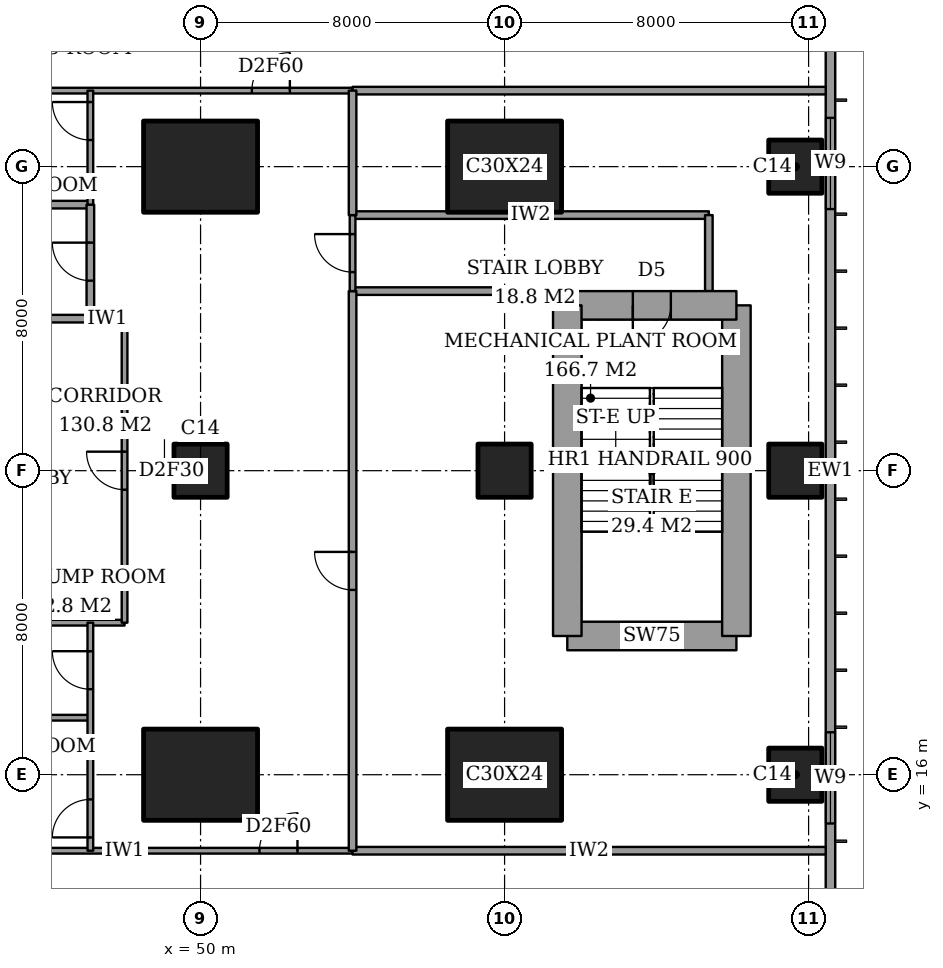
"""IFC4 building model, lengths in metres.
Left out: names, types, materials, properties, quantities, classifications, styles, units other than length and angle.
Written with IfcOpenShell. Run it as: python <this file> out.ifc"""

import sys

from ifc_helpers import new_model, si_unit, direction, frame, frame_2d, origin, origin_2d, place, context, subcontext, project, spatial, rectangle, extrude, element, fill, save


model = new_model("IFC4")
c1 = context("Model", 3, precision=1e-05, world=origin(), true_north=direction((0.0, 1.0)))
c2 = subcontext(c1, "Body", "Model", "MODEL_VIEW")
j1 = project(units=[si_unit("LENGTHUNIT", "METRE"), si_unit("PLANEANGLEUNIT", "RADIAN")], contexts=[c1])
p1 = place(None, origin())
s1 = spatial("IfcSite", under=j1, at=p1, CompositionType="ELEMENT")
p2 = place(p1, origin())
s2 = spatial("IfcBuilding", under=s1, at=p2, CompositionType="ELEMENT")
p3 = place(p2, frame((0.0, 0.0, 277.2)))
s3 = spatial("IfcBuildingStorey", under=s2, at=p3, CompositionType="ELEMENT", Elevation=277.2)
p4 = place(p3, frame((50.0, 16.0, 0.0), z_axis=(0.0, 0.0, 1.0), x_axis=(1.0, 0.0, 0.0)))
e1 = element("IfcColumn", 1, at=p4, inside=s3, PredefinedType="COLUMN", context=c2, shape_type="SweptSolid", body=[
    extrude(rectangle(XDim=3.0, YDim=2.4, at=origin_2d()), origin(), (0.0, 0.0, 1.0), 5.4),
])
p5 = place(p3, frame((50.0, 24.0, 0.0), z_axis=(0.0, 0.0, 1.0), x_axis=(1.0, 0.0, 0.0)))
e2 = element("IfcColumn", 2, at=p5, inside=s3, PredefinedType="COLUMN", context=c2, shape_type="SweptSolid", body=[
    extrude(rectangle(XDim=1.4, YDim=1.4, at=origin_2d()), origin(), (0.0, 0.0, 1.0), 5.4),
])
for number, where, z_axis, x_axis in (
    (3, (50.0, 32.0, 0.0), (0.0, 0.0, 1.0), (1.0, 0.0, 0.0)),
    (4, (58.0, 16.0, 0.0), (0.0, 0.0, 1.0), (1.0, 0.0, 0.0)),
):
    element("IfcColumn", number, at=place(p3, frame(where, z_axis=z_axis, x_axis=x_axis)), inside=s3, PredefinedType="COLUMN", context=c2, shape_type="SweptSolid", body=[
        extrude(rectangle(XDim=3.0, YDim=2.4, at=origin_2d()), origin(), (0.0, 0.0, 1.0), 5.4),
    ])
p6 = place(p3, frame((58.0, 24.0, 0.0), z_axis=(0.0, 0.0, 1.0), x_axis=(1.0, 0.0, 0.0)))
e5 = element("IfcColumn", 5, at=p6, inside=s3, PredefinedType="COLUMN", context=c2, shape_type="SweptSolid", body=[
    extrude(rectangle(XDim=1.4, YDim=1.4, at=origin_2d()), origin(), (0.0, 0.0, 1.0), 5.4),
])
p7 = place(p3, frame((58.0, 32.0, 0.0), z_axis=(0.0, 0.0, 1.0), x_axis=(1.0, 0.0, 0.0)))
e6 = element("IfcColumn", 6, at=p7, inside=s3, PredefinedType="COLUMN", context=c2, shape_type="SweptSolid", body=[
    extrude(rectangle(XDim=3.0, YDim=2.4, at=origin_2d()), origin(), (0.0, 0.0, 1.0), 5.4),
])
for number, where, z_axis, x_axis in (
    (7, (65.65, 16.0, 0.0), (0.0, 0.0, 1.0), (1.0, 0.0, 0.0)),
    (8, (65.65, 24.0, 0.0), (0.0, 0.0, 1.0), (1.0, 0.0, 0.0)),
    (9, (65.65, 32.0, 0.0), (0.0, 0.0, 1.0), (1.0, 0.0, 0.0)),
):
    element("IfcColumn", number, at=place(p3, frame(where, z_axis=z_axis, x_axis=x_axis)), inside=s3, PredefinedType="COLUMN", context=c2, shape_type="SweptSolid", body=[
        extrude(rectangle(XDim=1.4, YDim=1.4, at=origin_2d()), origin(), (0.0, 0.0, 1.0), 5.4),
    ])
p8 = place(p3, frame((59.65, 19.65, 0.0), z_axis=(0.0, 0.0, 1.0), x_axis=(1.0, 0.0, 0.0)))
e10 = element("IfcWall", 10, at=p8, inside=s3, PredefinedType="SHEAR", context=c2, shape_type="SweptSolid", body=[
    extrude(rectangle(XDim=4.45, YDim=0.75, at=frame_2d((2.225, 0.0))), origin(), (0.0, 0.0, 1.0), 5.4),
])
p9 = place(p3, frame((64.1, 19.65, 0.0), z_axis=(0.0, 0.0, 1.0), x_axis=(0.0, 1.0, 0.0)))
e11 = element("IfcWall", 11, at=p9, inside=s3, PredefinedType="SHEAR", context=c2, shape_type="SweptSolid", body=[
    extrude(rectangle(XDim=8.7, YDim=0.75, at=frame_2d((4.35, 0.0))), origin(), (0.0, 0.0, 1.0), 5.4),
])
p10 = place(p3, frame((64.1, 28.35, 0.0), z_axis=(0.0, 0.0, 1.0), x_axis=(-1.0, 0.0, 0.0)))
e12 = element("IfcWall", 12, at=p10, inside=s3, PredefinedType="SHEAR", context=c2, shape_type="SweptSolid", body=[
    extrude(rectangle(XDim=4.45, YDim=0.75, at=frame_2d((2.225, 0.0))), origin(), (0.0, 0.0, 1.0), 5.4),
])
p11 = place(p10, frame((1.725, 0.0, 0.0)))
e13 = element("IfcOpeningElement", 13, at=p11, cuts=e12, PredefinedType="OPENING", context=c2, shape_type="SweptSolid", body=[
    extrude(rectangle(XDim=1.0, YDim=2.1, at=frame_2d((0.5, 1.05))), frame((0.0, 0.385, 0.0), z_axis=(0.0, -1.0, 0.0), x_axis=(1.0, 0.0, 0.0)), (0.0, 0.0, 1.0), 0.77),
])
p12 = place(p3, frame((59.65, 28.35, 0.0), z_axis=(0.0, 0.0, 1.0), x_axis=(0.0, -1.0, 0.0)))
e14 = element("IfcWall", 14, at=p12, inside=s3, PredefinedType="SHEAR", context=c2, shape_type="SweptSolid", body=[
    extrude(rectangle(XDim=8.7, YDim=0.75, at=frame_2d((4.35, 0.0))), origin(), (0.0, 0.0, 1.0), 5.4),
])
p13 = place(p3, frame((66.575, 3.175, 0.0), z_axis=(0.0, 0.0, 1.0), x_axis=(0.0, 1.0, 0.0)))
e15 = element("IfcWall", 15, at=p13, inside=s3, PredefinedType="SOLIDWALL", context=c2, shape_type="SweptSolid", body=[
    extrude(rectangle(XDim=41.65, YDim=0.25, at=frame_2d((20.825, 0.0))), origin(), (0.0, 0.0, 1.0), 5.4),
])
p14 = place(p13, frame((0.908, 0.0, 0.9)))
e16 = element("IfcOpeningElement", 16, at=p14, cuts=e15, PredefinedType="OPENING", context=c2, shape_type="SweptSolid", body=[
    extrude(rectangle(XDim=2.4, YDim=2.4, at=frame_2d((1.2, 1.2))), frame((0.0, 0.135, 0.0), z_axis=(0.0, -1.0, 0.0), x_axis=(1.0, 0.0, 0.0)), (0.0, 0.0, 1.0), 0.27),
])
p15 = place(p13, frame((11.542, 0.0, 0.9)))
e17 = element("IfcOpeningElement", 17, at=p15, cuts=e15, PredefinedType="OPENING", context=c2, shape_type="SweptSolid", body=[
    extrude(rectangle(XDim=2.4, YDim=2.4, at=frame_2d((1.2, 1.2))), frame((0.0, 0.135, 0.0), z_axis=(0.0, -1.0, 0.0), x_axis=(1.0, 0.0, 0.0)), (0.0, 0.0, 1.0), 0.27),
])
p16 = place(p13, frame((27.708, 0.0, 0.9)))
e18 = element("IfcOpeningElement", 18, at=p16, cuts=e15, PredefinedType="OPENING", context=c2, shape_type="SweptSolid", body=[
    extrude(rectangle(XDim=2.4, YDim=2.4, at=frame_2d((1.2, 1.2))), frame((0.0, 0.135, 0.0), z_axis=(0.0, -1.0, 0.0), x_axis=(1.0, 0.0, 0.0)), (0.0, 0.0, 1.0), 0.27),
])
p17 = place(p13, frame((38.342, 0.0, 0.9)))
e19 = element("IfcOpeningElement", 19, at=p17, cuts=e15, PredefinedType="OPENING", context=c2, shape_type="SweptSolid", body=[
    extrude(rectangle(XDim=2.4, YDim=2.4, at=frame_2d((1.2, 1.2))), frame((0.0, 0.135, 0.0), z_axis=(0.0, -1.0, 0.0), x_axis=(1.0, 0.0, 0.0)), (0.0, 0.0, 1.0), 0.27),
])
p18 = place(p3, frame((54.0, 14.0, 0.0), z_axis=(0.0, 0.0, 1.0), x_axis=(1.0, 0.0, 0.0)))
e20 = element("IfcWall", 20, at=p18, inside=s3, PredefinedType="PARTITIONING", context=c2, shape_type="SweptSolid", body=[
    extrude(rectangle(XDim=12.45, YDim=0.2, at=frame_2d((6.225, 0.0))), origin(), (0.0, 0.0, 1.0), 5.15),
])
p19 = place(p3, frame((42.0, 14.0, 0.0), z_axis=(0.0, 0.0, 1.0), x_axis=(1.0, 0.0, 0.0)))
e21 = element("IfcWall", 21, at=p19, inside=s3, PredefinedType="PARTITIONING", context=c2, shape_type="SweptSolid", body=[
    extrude(rectangle(XDim=12.0, YDim=0.15, at=frame_2d((6.0, 0.0))), origin(), (0.0, 0.0, 1.0), 5.15),
])
p20 = place(p19, frame((9.55, 0.0, 0.0)))
e22 = element("IfcOpeningElement", 22, at=p20, cuts=e21, PredefinedType="OPENING", context=c2, shape_type="SweptSolid", body=[
    extrude(rectangle(XDim=1.0, YDim=2.1, at=frame_2d((0.5, 1.05))), frame((0.0, 0.085, 0.0), z_axis=(0.0, -1.0, 0.0), x_axis=(1.0, 0.0, 0.0)), (0.0, 0.0, 1.0), 0.17),
])
p21 = place(p3, frame((42.0, 17.5, 0.0), z_axis=(0.0, 0.0, 1.0), x_axis=(1.0, 0.0, 0.0)))
e23 = element("IfcWall", 23, at=p21, inside=s3, PredefinedType="PARTITIONING", context=c2, shape_type="SweptSolid", body=[
    extrude(rectangle(XDim=5.1, YDim=0.15, at=frame_2d((2.55, 0.0))), origin(), (0.0, 0.0, 1.0), 5.15),
])
p22 = place(p3, frame((42.0, 20.0, 0.0), z_axis=(0.0, 0.0, 1.0), x_axis=(1.0, 0.0, 0.0)))
e24 = element("IfcWall", 24, at=p22, inside=s3, PredefinedType="PARTITIONING", context=c2, shape_type="SweptSolid", body=[
    extrude(rectangle(XDim=6.0, YDim=0.15, at=frame_2d((3.0, 0.0))), origin(), (0.0, 0.0, 1.0), 5.15),
])
p23 = place(p3, frame((42.0, 28.0, 0.0), z_axis=(0.0, 0.0, 1.0), x_axis=(1.0, 0.0, 0.0)))
e25 = element("IfcWall", 25, at=p23, inside=s3, PredefinedType="PARTITIONING", context=c2, shape_type="SweptSolid", body=[
    extrude(rectangle(XDim=5.1, YDim=0.2, at=frame_2d((2.55, 0.0))), origin(), (0.0, 0.0, 1.0), 5.15),
])
p24 = place(p3, frame((47.1, 28.0, 0.0), z_axis=(0.0, 0.0, 1.0), x_axis=(1.0, 0.0, 0.0)))
e26 = element("IfcWall", 26, at=p24, inside=s3, PredefinedType="PARTITIONING", context=c2, shape_type="SweptSolid", body=[
    extrude(rectangle(XDim=0.9, YDim=0.15, at=frame_2d((0.45, 0.0))), origin(), (0.0, 0.0, 1.0), 5.15),
])
p25 = place(p3, frame((54.0, 28.725, 0.0), z_axis=(0.0, 0.0, 1.0), x_axis=(1.0, 0.0, 0.0)))
e27 = element("IfcWall", 27, at=p25, inside=s3, PredefinedType="PARTITIONING", context=c2, shape_type="SweptSolid", body=[
    extrude(rectangle(XDim=5.65, YDim=0.2, at=frame_2d((2.825, 0.0))), origin(), (0.0, 0.0, 1.0), 5.15),
])
p26 = place(p3, frame((54.0, 30.725, 0.0), z_axis=(0.0, 0.0, 1.0), x_axis=(1.0, 0.0, 0.0)))
e28 = element("IfcWall", 28, at=p26, inside=s3, PredefinedType="PARTITIONING", context=c2, shape_type="SweptSolid", body=[
    extrude(rectangle(XDim=9.375, YDim=0.2, at=frame_2d((4.688, 0.0))), origin(), (0.0, 0.0, 1.0), 5.15),
])
p27 = place(p3, frame((42.0, 31.0, 0.0), z_axis=(0.0, 0.0, 1.0), x_axis=(1.0, 0.0, 0.0)))
e29 = element("IfcWall", 29, at=p27, inside=s3, PredefinedType="PARTITIONING", context=c2, shape_type="SweptSolid", body=[
    extrude(rectangle(XDim=5.1, YDim=0.2, at=frame_2d((2.55, 0.0))), origin(), (0.0, 0.0, 1.0), 5.15),
])
p28 = place(p3, frame((54.0, 34.0, 0.0), z_axis=(0.0, 0.0, 1.0), x_axis=(1.0, 0.0, 0.0)))
e30 = element("IfcWall", 30, at=p28, inside=s3, PredefinedType="PARTITIONING", context=c2, shape_type="SweptSolid", body=[
    extrude(rectangle(XDim=12.45, YDim=0.2, at=frame_2d((6.225, 0.0))), origin(), (0.0, 0.0, 1.0), 5.15),
])
p29 = place(p3, frame((42.0, 34.0, 0.0), z_axis=(0.0, 0.0, 1.0), x_axis=(1.0, 0.0, 0.0)))
e31 = element("IfcWall", 31, at=p29, inside=s3, PredefinedType="PARTITIONING", context=c2, shape_type="SweptSolid", body=[
    extrude(rectangle(XDim=12.0, YDim=0.15, at=frame_2d((6.0, 0.0))), origin(), (0.0, 0.0, 1.0), 5.15),
])
p30 = place(p29, frame((9.35, 0.0, 0.0)))
e32 = element("IfcOpeningElement", 32, at=p30, cuts=e31, PredefinedType="OPENING", context=c2, shape_type="SweptSolid", body=[
    extrude(rectangle(XDim=1.0, YDim=2.1, at=frame_2d((0.5, 1.05))), frame((0.0, 0.085, 0.0), z_axis=(0.0, -1.0, 0.0), x_axis=(1.0, 0.0, 0.0)), (0.0, 0.0, 1.0), 0.17),
])
p31 = place(p3, frame((47.1, 28.0, 0.0), z_axis=(0.0, 0.0, 1.0), x_axis=(0.0, 1.0, 0.0)))
e33 = element("IfcWall", 33, at=p31, inside=s3, PredefinedType="PARTITIONING", context=c2, shape_type="SweptSolid", body=[
    extrude(rectangle(XDim=3.0, YDim=0.2, at=frame_2d((1.5, 0.0))), origin(), (0.0, 0.0, 1.0), 5.15),
])
p32 = place(p31, frame((1.0, 0.0, 0.0)))
e34 = element("IfcOpeningElement", 34, at=p32, cuts=e33, PredefinedType="OPENING", context=c2, shape_type="SweptSolid", body=[
    extrude(rectangle(XDim=1.0, YDim=2.1, at=frame_2d((0.5, 1.05))), frame((0.0, 0.11, 0.0), z_axis=(0.0, -1.0, 0.0), x_axis=(1.0, 0.0, 0.0)), (0.0, 0.0, 1.0), 0.22),
])
p33 = place(p3, frame((47.1, 14.0, 0.0), z_axis=(0.0, 0.0, 1.0), x_axis=(0.0, 1.0, 0.0)))
e35 = element("IfcWall", 35, at=p33, inside=s3, PredefinedType="PARTITIONING", context=c2, shape_type="SweptSolid", body=[
    extrude(rectangle(XDim=6.0, YDim=0.15, at=frame_2d((3.0, 0.0))), origin(), (0.0, 0.0, 1.0), 5.15),
])
p34 = place(p33, frame((0.35, 0.0, 0.0)))
e36 = element("IfcOpeningElement", 36, at=p34, cuts=e35, PredefinedType="OPENING", context=c2, shape_type="SweptSolid", body=[
    extrude(rectangle(XDim=1.0, YDim=2.1, at=frame_2d((0.5, 1.05))), frame((0.0, 0.085, 0.0), z_axis=(0.0, -1.0, 0.0), x_axis=(1.0, 0.0, 0.0)), (0.0, 0.0, 1.0), 0.17),
])
p35 = place(p33, frame((4.25, 0.0, 0.0)))
e37 = element("IfcOpeningElement", 37, at=p35, cuts=e35, PredefinedType="OPENING", context=c2, shape_type="SweptSolid", body=[
    extrude(rectangle(XDim=1.0, YDim=2.1, at=frame_2d((0.5, 1.05))), frame((0.0, 0.085, 0.0), z_axis=(0.0, -1.0, 0.0), x_axis=(1.0, 0.0, 0.0)), (0.0, 0.0, 1.0), 0.17),
])
p36 = place(p3, frame((47.1, 31.0, 0.0), z_axis=(0.0, 0.0, 1.0), x_axis=(0.0, 1.0, 0.0)))
e38 = element("IfcWall", 38, at=p36, inside=s3, PredefinedType="PARTITIONING", context=c2, shape_type="SweptSolid", body=[
    extrude(rectangle(XDim=3.0, YDim=0.15, at=frame_2d((1.5, 0.0))), origin(), (0.0, 0.0, 1.0), 5.15),
])
p37 = place(p36, frame((1.7, 0.0, 0.0)))
e39 = element("IfcOpeningElement", 39, at=p37, cuts=e38, PredefinedType="OPENING", context=c2, shape_type="SweptSolid", body=[
    extrude(rectangle(XDim=1.0, YDim=2.1, at=frame_2d((0.5, 1.05))), frame((0.0, 0.085, 0.0), z_axis=(0.0, -1.0, 0.0), x_axis=(1.0, 0.0, 0.0)), (0.0, 0.0, 1.0), 0.17),
])
p38 = place(p3, frame((48.0, 20.0, 0.0), z_axis=(0.0, 0.0, 1.0), x_axis=(0.0, 1.0, 0.0)))
e40 = element("IfcWall", 40, at=p38, inside=s3, PredefinedType="PARTITIONING", context=c2, shape_type="SweptSolid", body=[
    extrude(rectangle(XDim=8.0, YDim=0.15, at=frame_2d((4.0, 0.0))), origin(), (0.0, 0.0, 1.0), 5.15),
])
p39 = place(p38, frame((3.5, 0.0, 0.0)))
e41 = element("IfcOpeningElement", 41, at=p39, cuts=e40, PredefinedType="OPENING", context=c2, shape_type="SweptSolid", body=[
    extrude(rectangle(XDim=1.0, YDim=2.1, at=frame_2d((0.5, 1.05))), frame((0.0, 0.085, 0.0), z_axis=(0.0, -1.0, 0.0), x_axis=(1.0, 0.0, 0.0)), (0.0, 0.0, 1.0), 0.17),
])
p40 = place(p3, frame((54.0, 14.0, 0.0), z_axis=(0.0, 0.0, 1.0), x_axis=(0.0, 1.0, 0.0)))
e42 = element("IfcWall", 42, at=p40, inside=s3, PredefinedType="PARTITIONING", context=c2, shape_type="SweptSolid", body=[
    extrude(rectangle(XDim=14.725, YDim=0.2, at=frame_2d((7.363, 0.0))), origin(), (0.0, 0.0, 1.0), 5.15),
])
p41 = place(p40, frame((6.863, 0.0, 0.0)))
e43 = element("IfcOpeningElement", 43, at=p41, cuts=e42, PredefinedType="OPENING", context=c2, shape_type="SweptSolid", body=[
    extrude(rectangle(XDim=1.0, YDim=2.1, at=frame_2d((0.5, 1.05))), frame((0.0, 0.11, 0.0), z_axis=(0.0, -1.0, 0.0), x_axis=(1.0, 0.0, 0.0)), (0.0, 0.0, 1.0), 0.22),
])
p42 = place(p3, frame((54.0, 30.725, 0.0), z_axis=(0.0, 0.0, 1.0), x_axis=(0.0, 1.0, 0.0)))
e44 = element("IfcWall", 44, at=p42, inside=s3, PredefinedType="PARTITIONING", context=c2, shape_type="SweptSolid", body=[
    extrude(rectangle(XDim=3.275, YDim=0.2, at=frame_2d((1.637, 0.0))), origin(), (0.0, 0.0, 1.0), 5.15),
])
p43 = place(p3, frame((54.0, 28.725, 0.0), z_axis=(0.0, 0.0, 1.0), x_axis=(0.0, 1.0, 0.0)))
e45 = element("IfcWall", 45, at=p43, inside=s3, PredefinedType="PARTITIONING", context=c2, shape_type="SweptSolid", body=[
    extrude(rectangle(XDim=2.0, YDim=0.15, at=frame_2d((1.0, 0.0))), origin(), (0.0, 0.0, 1.0), 5.15),
])
p44 = place(p43, frame((0.5, 0.0, 0.0)))
e46 = element("IfcOpeningElement", 46, at=p44, cuts=e45, PredefinedType="OPENING", context=c2, shape_type="SweptSolid", body=[
    extrude(rectangle(XDim=1.0, YDim=2.1, at=frame_2d((0.5, 1.05))), frame((0.0, 0.085, 0.0), z_axis=(0.0, -1.0, 0.0), x_axis=(1.0, 0.0, 0.0)), (0.0, 0.0, 1.0), 0.17),
])
p45 = place(p3, frame((63.375, 28.725, 0.0), z_axis=(0.0, 0.0, 1.0), x_axis=(0.0, 1.0, 0.0)))
e47 = element("IfcWall", 47, at=p45, inside=s3, PredefinedType="PARTITIONING", context=c2, shape_type="SweptSolid", body=[
    extrude(rectangle(XDim=2.0, YDim=0.2, at=frame_2d((1.0, 0.0))), origin(), (0.0, 0.0, 1.0), 5.15),
])
p46 = place(p15, origin())
e48 = element("IfcWindow", 48, at=p46, inside=s3, PartitioningType="SINGLE_PANEL", PredefinedType="WINDOW", context=c2, shape_type="SweptSolid", body=[
    extrude(rectangle(XDim=2.4, YDim=2.4, at=frame_2d((1.2, 1.2))), frame((0.0, 0.03, 0.0), z_axis=(0.0, -1.0, 0.0), x_axis=(1.0, 0.0, 0.0)), (0.0, 0.0, 1.0), 0.06),
])
fill(e17, e48)
p47 = place(p16, origin())
e49 = element("IfcWindow", 49, at=p47, inside=s3, PartitioningType="SINGLE_PANEL", PredefinedType="WINDOW", context=c2, shape_type="SweptSolid", body=[
    extrude(rectangle(XDim=2.4, YDim=2.4, at=frame_2d((1.2, 1.2))), frame((0.0, 0.03, 0.0), z_axis=(0.0, -1.0, 0.0), x_axis=(1.0, 0.0, 0.0)), (0.0, 0.0, 1.0), 0.06),
])
fill(e18, e49)
p48 = place(p20, origin())
e50 = element("IfcDoor", 50, at=p48, inside=s3, OperationType="SINGLE_SWING_LEFT", PredefinedType="DOOR", context=c2, shape_type="SweptSolid", body=[
    extrude(rectangle(XDim=1.0, YDim=2.1, at=frame_2d((0.5, 1.05))), frame((0.0, 0.025, 0.0), z_axis=(0.0, -1.0, 0.0), x_axis=(1.0, 0.0, 0.0)), (0.0, 0.0, 1.0), 0.05),
])
fill(e22, e50)
p49 = place(p41, origin())
e51 = element("IfcDoor", 51, at=p49, inside=s3, OperationType="SINGLE_SWING_LEFT", PredefinedType="DOOR", context=c2, shape_type="SweptSolid", body=[
    extrude(rectangle(XDim=1.0, YDim=2.1, at=frame_2d((0.5, 1.05))), frame((0.0, 0.025, 0.0), z_axis=(0.0, -1.0, 0.0), x_axis=(1.0, 0.0, 0.0)), (0.0, 0.0, 1.0), 0.05),
])
fill(e43, e51)
p50 = place(p30, origin())
e52 = element("IfcDoor", 52, at=p50, inside=s3, OperationType="SINGLE_SWING_LEFT", PredefinedType="DOOR", context=c2, shape_type="SweptSolid", body=[
    extrude(rectangle(XDim=1.0, YDim=2.1, at=frame_2d((0.5, 1.05))), frame((0.0, 0.025, 0.0), z_axis=(0.0, -1.0, 0.0), x_axis=(1.0, 0.0, 0.0)), (0.0, 0.0, 1.0), 0.05),
])
fill(e32, e52)
p51 = place(p39, origin())
e53 = element("IfcDoor", 53, at=p51, inside=s3, OperationType="SINGLE_SWING_LEFT", PredefinedType="DOOR", context=c2, shape_type="SweptSolid", body=[
    extrude(rectangle(XDim=1.0, YDim=2.1, at=frame_2d((0.5, 1.05))), frame((0.0, 0.025, 0.0), z_axis=(0.0, -1.0, 0.0), x_axis=(1.0, 0.0, 0.0)), (0.0, 0.0, 1.0), 0.05),
])
fill(e41, e53)
p52 = place(p34, origin())
e54 = element("IfcDoor", 54, at=p52, inside=s3, OperationType="SINGLE_SWING_RIGHT", PredefinedType="DOOR", context=c2, shape_type="SweptSolid", body=[
    extrude(rectangle(XDim=1.0, YDim=2.1, at=frame_2d((0.5, 1.05))), frame((0.0, 0.025, 0.0), z_axis=(0.0, -1.0, 0.0), x_axis=(1.0, 0.0, 0.0)), (0.0, 0.0, 1.0), 0.05),
])
fill(e36, e54)
p53 = place(p35, origin())
e55 = element("IfcDoor", 55, at=p53, inside=s3, OperationType="SINGLE_SWING_LEFT", PredefinedType="DOOR", context=c2, shape_type="SweptSolid", body=[
    extrude(rectangle(XDim=1.0, YDim=2.1, at=frame_2d((0.5, 1.05))), frame((0.0, 0.025, 0.0), z_axis=(0.0, -1.0, 0.0), x_axis=(1.0, 0.0, 0.0)), (0.0, 0.0, 1.0), 0.05),
])
fill(e37, e55)
p54 = place(p32, origin())
e56 = element("IfcDoor", 56, at=p54, inside=s3, OperationType="SINGLE_SWING_LEFT", PredefinedType="DOOR", context=c2, shape_type="SweptSolid", body=[
    extrude(rectangle(XDim=1.0, YDim=2.1, at=frame_2d((0.5, 1.05))), frame((0.0, 0.025, 0.0), z_axis=(0.0, -1.0, 0.0), x_axis=(1.0, 0.0, 0.0)), (0.0, 0.0, 1.0), 0.05),
])
fill(e34, e56)
p55 = place(p37, origin())
e57 = element("IfcDoor", 57, at=p55, inside=s3, OperationType="SINGLE_SWING_LEFT", PredefinedType="DOOR", context=c2, shape_type="SweptSolid", body=[
    extrude(rectangle(XDim=1.0, YDim=2.1, at=frame_2d((0.5, 1.05))), frame((0.0, 0.025, 0.0), z_axis=(0.0, -1.0, 0.0), x_axis=(1.0, 0.0, 0.0)), (0.0, 0.0, 1.0), 0.05),
])
fill(e39, e57)
p56 = place(p44, origin())
e58 = element("IfcDoor", 58, at=p56, inside=s3, OperationType="SINGLE_SWING_LEFT", PredefinedType="DOOR", context=c2, shape_type="SweptSolid", body=[
    extrude(rectangle(XDim=1.0, YDim=2.1, at=frame_2d((0.5, 1.05))), frame((0.0, 0.025, 0.0), z_axis=(0.0, -1.0, 0.0), x_axis=(1.0, 0.0, 0.0)), (0.0, 0.0, 1.0), 0.05),
])
fill(e46, e58)
p57 = place(p11, origin())
e59 = element("IfcDoor", 59, at=p57, inside=s3, OperationType="SINGLE_SWING_LEFT", PredefinedType="DOOR", context=c2, shape_type="SweptSolid", body=[
    extrude(rectangle(XDim=1.0, YDim=2.1, at=frame_2d((0.5, 1.05))), frame((0.0, 0.025, 0.0), z_axis=(0.0, -1.0, 0.0), x_axis=(1.0, 0.0, 0.0)), (0.0, 0.0, 1.0), 0.05),
])
fill(e13, e59)
save(model, sys.argv[1])
